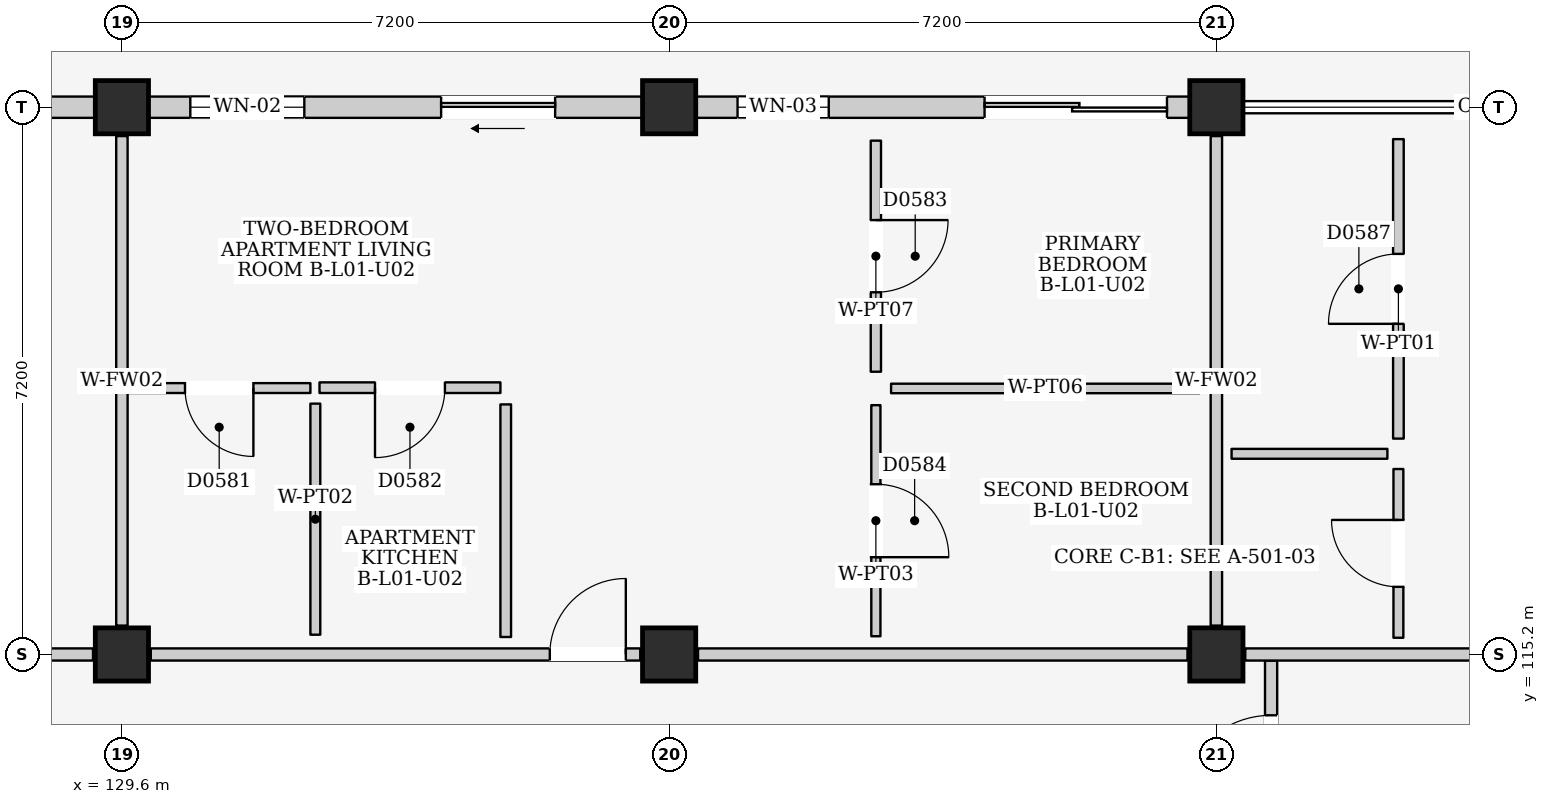
"""IFC4 building model, lengths in metres.
Left out: names, types, materials, properties, quantities, classifications, styles, units other than length and angle.
Written with IfcOpenShell. Run it as: python <this file> out.ifc"""

import sys

from ifc_helpers import new_model, si_unit, direction, frame, frame_2d, origin, origin_2d, place, context, subcontext, project, spatial, rectangle, extrude, element, fill, save


model = new_model("IFC4")
c1 = context("Model", 3, precision=1e-05, world=origin(), true_north=direction((0.0, 1.0)))
c2 = subcontext(c1, "Body", "Model", "MODEL_VIEW")
j1 = project(units=[si_unit("LENGTHUNIT", "METRE"), si_unit("PLANEANGLEUNIT", "RADIAN")], contexts=[c1])
p1 = place(None, origin())
s1 = spatial("IfcSite", under=j1, at=p1, CompositionType="ELEMENT")
p2 = place(p1, origin())
s2 = spatial("IfcBuilding", under=s1, at=p2, CompositionType="ELEMENT")
p3 = place(p2, frame((0.0, 0.0, 4.5)))
s3 = spatial("IfcBuildingStorey", under=s2, at=p3, CompositionType="ELEMENT", Elevation=4.5)
for number, where, z_axis, x_axis in (
    (1, (129.6, 115.2, 0.0), (0.0, 0.0, 1.0), (1.0, 0.0, 0.0)),
    (2, (129.6, 122.4, 0.0), (0.0, 0.0, 1.0), (1.0, 0.0, 0.0)),
    (3, (136.8, 115.2, 0.0), (0.0, 0.0, 1.0), (1.0, 0.0, 0.0)),
    (4, (136.8, 122.4, 0.0), (0.0, 0.0, 1.0), (1.0, 0.0, 0.0)),
    (5, (144.0, 115.2, 0.0), (0.0, 0.0, 1.0), (1.0, 0.0, 0.0)),
    (6, (144.0, 122.4, 0.0), (0.0, 0.0, 1.0), (1.0, 0.0, 0.0)),
):
    element("IfcColumn", number, at=place(p3, frame(where, z_axis=z_axis, x_axis=x_axis)), inside=s3, PredefinedType="COLUMN", context=c2, shape_type="SweptSolid", body=[
        extrude(rectangle(XDim=0.7, YDim=0.7, at=origin_2d()), origin(), (0.0, 0.0, 1.0), 4.5),
    ])
p4 = place(p3, frame((122.75, 122.4, 0.0), z_axis=(0.0, 0.0, 1.0), x_axis=(1.0, 0.0, 0.0)))
e7 = element("IfcWall", 7, at=p4, inside=s3, PredefinedType="ELEMENTEDWALL", context=c2, shape_type="SweptSolid", body=[
    extrude(rectangle(XDim=6.5, YDim=0.28, at=frame_2d((3.25, 0.0))), origin(), (0.0, 0.0, 1.0), 3.715),
])
p5 = place(p4, frame((3.85, 0.0, 0.0)))
e8 = element("IfcOpeningElement", 8, at=p5, cuts=e7, PredefinedType="OPENING", context=c2, shape_type="SweptSolid", body=[
    extrude(rectangle(XDim=1.6, YDim=2.12, at=frame_2d((0.8, 1.06))), frame((0.0, 0.155, 0.0), z_axis=(0.0, -1.0, 0.0), x_axis=(1.0, 0.0, 0.0)), (0.0, 0.0, 1.0), 0.31),
])
p6 = place(p4, frame((0.55, 0.0, 0.9)))
e9 = element("IfcOpeningElement", 9, at=p6, cuts=e7, PredefinedType="OPENING", context=c2, shape_type="SweptSolid", body=[
    extrude(rectangle(XDim=1.8, YDim=1.5, at=frame_2d((0.9, 0.75))), frame((0.0, 0.155, 0.0), z_axis=(0.0, -1.0, 0.0), x_axis=(1.0, 0.0, 0.0)), (0.0, 0.0, 1.0), 0.31),
])
p7 = place(p3, frame((129.95, 122.4, 0.0), z_axis=(0.0, 0.0, 1.0), x_axis=(1.0, 0.0, 0.0)))
e10 = element("IfcWall", 10, at=p7, inside=s3, PredefinedType="ELEMENTEDWALL", context=c2, shape_type="SweptSolid", body=[
    extrude(rectangle(XDim=6.5, YDim=0.28, at=frame_2d((3.25, 0.0))), origin(), (0.0, 0.0, 1.0), 3.715),
])
p8 = place(p7, frame((3.85, 0.0, 0.0)))
e11 = element("IfcOpeningElement", 11, at=p8, cuts=e10, PredefinedType="OPENING", context=c2, shape_type="SweptSolid", body=[
    extrude(rectangle(XDim=1.5, YDim=2.12, at=frame_2d((0.75, 1.06))), frame((0.0, 0.155, 0.0), z_axis=(0.0, -1.0, 0.0), x_axis=(1.0, 0.0, 0.0)), (0.0, 0.0, 1.0), 0.31),
])
p9 = place(p7, frame((0.55, 0.0, 0.9)))
e12 = element("IfcOpeningElement", 12, at=p9, cuts=e10, PredefinedType="OPENING", context=c2, shape_type="SweptSolid", body=[
    extrude(rectangle(XDim=1.5, YDim=1.5, at=frame_2d((0.75, 0.75))), frame((0.0, 0.155, 0.0), z_axis=(0.0, -1.0, 0.0), x_axis=(1.0, 0.0, 0.0)), (0.0, 0.0, 1.0), 0.31),
])
p10 = place(p3, frame((137.15, 122.4, 0.0), z_axis=(0.0, 0.0, 1.0), x_axis=(1.0, 0.0, 0.0)))
e13 = element("IfcWall", 13, at=p10, inside=s3, PredefinedType="ELEMENTEDWALL", context=c2, shape_type="SweptSolid", body=[
    extrude(rectangle(XDim=6.5, YDim=0.28, at=frame_2d((3.25, 0.0))), origin(), (0.0, 0.0, 1.0), 3.715),
])
p11 = place(p10, frame((3.8, 0.0, 0.0)))
e14 = element("IfcOpeningElement", 14, at=p11, cuts=e13, PredefinedType="OPENING", context=c2, shape_type="SweptSolid", body=[
    extrude(rectangle(XDim=2.4, YDim=2.12, at=frame_2d((1.2, 1.06))), frame((0.0, 0.155, 0.0), z_axis=(0.0, -1.0, 0.0), x_axis=(1.0, 0.0, 0.0)), (0.0, 0.0, 1.0), 0.31),
])
p12 = place(p10, frame((0.55, 0.0, 0.9)))
e15 = element("IfcOpeningElement", 15, at=p12, cuts=e13, PredefinedType="OPENING", context=c2, shape_type="SweptSolid", body=[
    extrude(rectangle(XDim=1.2, YDim=1.35, at=frame_2d((0.6, 0.675))), frame((0.0, 0.155, 0.0), z_axis=(0.0, -1.0, 0.0), x_axis=(1.0, 0.0, 0.0)), (0.0, 0.0, 1.0), 0.31),
])
p13 = place(p3, frame((144.72, 111.1, 0.0), z_axis=(0.0, 0.0, 1.0), x_axis=(0.0, 1.0, 0.0)))
e16 = element("IfcWall", 16, at=p13, inside=s3, PredefinedType="PARTITIONING", context=c2, shape_type="SweptSolid", body=[
    extrude(rectangle(XDim=4.02, YDim=0.16, at=frame_2d((2.01, 0.0))), origin(), (0.0, 0.0, 1.0), 4.25),
])
p14 = place(p13, frame((2.1, 0.0, 0.0)))
e17 = element("IfcOpeningElement", 17, at=p14, cuts=e16, PredefinedType="OPENING", context=c2, shape_type="SweptSolid", body=[
    extrude(rectangle(XDim=1.2, YDim=2.2, at=frame_2d((0.6, 1.1))), frame((0.0, 0.095, 0.0), z_axis=(0.0, -1.0, 0.0), x_axis=(1.0, 0.0, 0.0)), (0.0, 0.0, 1.0), 0.19),
])
p15 = place(p3, frame((122.78, 115.2, 0.0), z_axis=(0.0, 0.0, 1.0), x_axis=(1.0, 0.0, 0.0)))
e18 = element("IfcWall", 18, at=p15, inside=s3, PredefinedType="PARTITIONING", context=c2, shape_type="SweptSolid", body=[
    extrude(rectangle(XDim=6.44, YDim=0.16, at=frame_2d((3.22, 0.0))), origin(), (0.0, 0.0, 1.0), 3.635),
])
p16 = place(p15, frame((4.045, 0.0, 0.0)))
e19 = element("IfcOpeningElement", 19, at=p16, cuts=e18, PredefinedType="OPENING", context=c2, shape_type="SweptSolid", body=[
    extrude(rectangle(XDim=1.05, YDim=2.2, at=frame_2d((0.525, 1.1))), frame((0.0, 0.095, 0.0), z_axis=(0.0, -1.0, 0.0), x_axis=(1.0, 0.0, 0.0)), (0.0, 0.0, 1.0), 0.19),
])
p17 = place(p3, frame((129.6, 115.58, 0.0), z_axis=(0.0, 0.0, 1.0), x_axis=(0.0, 1.0, 0.0)))
e20 = element("IfcWall", 20, at=p17, inside=s3, PredefinedType="PARTITIONING", context=c2, shape_type="SweptSolid", body=[
    extrude(rectangle(XDim=6.44, YDim=0.15, at=frame_2d((3.22, 0.0))), origin(), (0.0, 0.0, 1.0), 3.685),
])
p18 = place(p3, frame((129.98, 115.2, 0.0), z_axis=(0.0, 0.0, 1.0), x_axis=(1.0, 0.0, 0.0)))
e21 = element("IfcWall", 21, at=p18, inside=s3, PredefinedType="PARTITIONING", context=c2, shape_type="SweptSolid", body=[
    extrude(rectangle(XDim=6.44, YDim=0.16, at=frame_2d((3.22, 0.0))), origin(), (0.0, 0.0, 1.0), 3.635),
])
p19 = place(p18, frame((5.25, 0.0, 0.0)))
e22 = element("IfcOpeningElement", 22, at=p19, cuts=e21, PredefinedType="OPENING", context=c2, shape_type="SweptSolid", body=[
    extrude(rectangle(XDim=1.0, YDim=2.15, at=frame_2d((0.5, 1.075))), frame((0.0, 0.095, 0.0), z_axis=(0.0, -1.0, 0.0), x_axis=(1.0, 0.0, 0.0)), (0.0, 0.0, 1.0), 0.19),
])
p20 = place(p3, frame((137.18, 115.2, 0.0), z_axis=(0.0, 0.0, 1.0), x_axis=(1.0, 0.0, 0.0)))
e23 = element("IfcWall", 23, at=p20, inside=s3, PredefinedType="PARTITIONING", context=c2, shape_type="SweptSolid", body=[
    extrude(rectangle(XDim=6.44, YDim=0.16, at=frame_2d((3.22, 0.0))), origin(), (0.0, 0.0, 1.0), 3.635),
])
p21 = place(p3, frame((144.0, 115.58, 0.0), z_axis=(0.0, 0.0, 1.0), x_axis=(0.0, 1.0, 0.0)))
e24 = element("IfcWall", 24, at=p21, inside=s3, PredefinedType="PARTITIONING", context=c2, shape_type="SweptSolid", body=[
    extrude(rectangle(XDim=6.44, YDim=0.15, at=frame_2d((3.22, 0.0))), origin(), (0.0, 0.0, 1.0), 3.685),
])
p22 = place(p3, frame((129.68, 118.705, 0.0), z_axis=(0.0, 0.0, 1.0), x_axis=(1.0, 0.0, 0.0)))
e25 = element("IfcWall", 25, at=p22, inside=s3, PredefinedType="PARTITIONING", context=c2, shape_type="SweptSolid", body=[
    extrude(rectangle(XDim=2.4, YDim=0.13, at=frame_2d((1.2, 0.0))), origin(), (0.0, 0.0, 1.0), 4.25),
])
p23 = place(p22, frame((0.75, 0.0, 0.0)))
e26 = element("IfcOpeningElement", 26, at=p23, cuts=e25, PredefinedType="OPENING", context=c2, shape_type="SweptSolid", body=[
    extrude(rectangle(XDim=0.9, YDim=2.1, at=frame_2d((0.45, 1.05))), frame((0.0, 0.08, 0.0), z_axis=(0.0, -1.0, 0.0), x_axis=(1.0, 0.0, 0.0)), (0.0, 0.0, 1.0), 0.16),
])
p24 = place(p3, frame((132.145, 115.46, 0.0), z_axis=(0.0, 0.0, 1.0), x_axis=(0.0, 1.0, 0.0)))
e27 = element("IfcWall", 27, at=p24, inside=s3, PredefinedType="PARTITIONING", context=c2, shape_type="SweptSolid", body=[
    extrude(rectangle(XDim=3.04, YDim=0.13, at=frame_2d((1.52, 0.0))), origin(), (0.0, 0.0, 1.0), 4.25),
])
p25 = place(p3, frame((132.2, 118.71, 0.0), z_axis=(0.0, 0.0, 1.0), x_axis=(1.0, 0.0, 0.0)))
e28 = element("IfcWall", 28, at=p25, inside=s3, PredefinedType="PARTITIONING", context=c2, shape_type="SweptSolid", body=[
    extrude(rectangle(XDim=2.38, YDim=0.14, at=frame_2d((1.19, 0.0))), origin(), (0.0, 0.0, 1.0), 4.25),
])
p26 = place(p25, frame((0.73, 0.0, 0.0)))
e29 = element("IfcOpeningElement", 29, at=p26, cuts=e28, PredefinedType="OPENING", context=c2, shape_type="SweptSolid", body=[
    extrude(rectangle(XDim=0.92, YDim=2.1, at=frame_2d((0.46, 1.05))), frame((0.0, 0.085, 0.0), z_axis=(0.0, -1.0, 0.0), x_axis=(1.0, 0.0, 0.0)), (0.0, 0.0, 1.0), 0.17),
])
p27 = place(p3, frame((134.65, 115.43, 0.0), z_axis=(0.0, 0.0, 1.0), x_axis=(0.0, 1.0, 0.0)))
e30 = element("IfcWall", 30, at=p27, inside=s3, PredefinedType="PARTITIONING", context=c2, shape_type="SweptSolid", body=[
    extrude(rectangle(XDim=3.06, YDim=0.14, at=frame_2d((1.53, 0.0))), origin(), (0.0, 0.0, 1.0), 4.25),
])
p28 = place(p3, frame((139.52, 118.92, 0.0), z_axis=(0.0, 0.0, 1.0), x_axis=(0.0, 1.0, 0.0)))
e31 = element("IfcWall", 31, at=p28, inside=s3, PredefinedType="PARTITIONING", context=c2, shape_type="SweptSolid", body=[
    extrude(rectangle(XDim=3.04, YDim=0.135, at=frame_2d((1.52, 0.0))), origin(), (0.0, 0.0, 1.0), 4.25),
])
p29 = place(p28, frame((1.045, 0.0, 0.0)))
e32 = element("IfcOpeningElement", 32, at=p29, cuts=e31, PredefinedType="OPENING", context=c2, shape_type="SweptSolid", body=[
    extrude(rectangle(XDim=0.95, YDim=2.15, at=frame_2d((0.475, 1.075))), frame((0.0, 0.083, 0.0), z_axis=(0.0, -1.0, 0.0), x_axis=(1.0, 0.0, 0.0)), (0.0, 0.0, 1.0), 0.165),
])
p30 = place(p3, frame((139.72, 118.7, 0.0), z_axis=(0.0, 0.0, 1.0), x_axis=(1.0, 0.0, 0.0)))
e33 = element("IfcWall", 33, at=p30, inside=s3, PredefinedType="PARTITIONING", context=c2, shape_type="SweptSolid", body=[
    extrude(rectangle(XDim=4.06, YDim=0.125, at=frame_2d((2.03, 0.0))), origin(), (0.0, 0.0, 1.0), 4.25),
])
p31 = place(p3, frame((139.52, 115.44, 0.0), z_axis=(0.0, 0.0, 1.0), x_axis=(0.0, 1.0, 0.0)))
e34 = element("IfcWall", 34, at=p31, inside=s3, PredefinedType="PARTITIONING", context=c2, shape_type="SweptSolid", body=[
    extrude(rectangle(XDim=3.04, YDim=0.12, at=frame_2d((1.52, 0.0))), origin(), (0.0, 0.0, 1.0), 4.25),
])
p32 = place(p31, frame((1.04, 0.0, 0.0)))
e35 = element("IfcOpeningElement", 35, at=p32, cuts=e34, PredefinedType="OPENING", context=c2, shape_type="SweptSolid", body=[
    extrude(rectangle(XDim=0.96, YDim=2.15, at=frame_2d((0.48, 1.075))), frame((0.0, 0.075, 0.0), z_axis=(0.0, -1.0, 0.0), x_axis=(1.0, 0.0, 0.0)), (0.0, 0.0, 1.0), 0.15),
])
p33 = place(p3, frame((144.38, 115.2, 0.0), z_axis=(0.0, 0.0, 1.0), x_axis=(1.0, 0.0, 0.0)))
e36 = element("IfcWall", 36, at=p33, inside=s3, PredefinedType="PARTITIONING", context=c2, shape_type="SweptSolid", body=[
    extrude(rectangle(XDim=6.44, YDim=0.16, at=frame_2d((3.22, 0.0))), origin(), (0.0, 0.0, 1.0), 3.635),
])
p34 = place(p33, frame((4.07, 0.0, 0.0)))
e37 = element("IfcOpeningElement", 37, at=p34, cuts=e36, PredefinedType="OPENING", context=c2, shape_type="SweptSolid", body=[
    extrude(rectangle(XDim=1.0, YDim=2.15, at=frame_2d((0.5, 1.075))), frame((0.0, 0.095, 0.0), z_axis=(0.0, -1.0, 0.0), x_axis=(1.0, 0.0, 0.0)), (0.0, 0.0, 1.0), 0.19),
])
p35 = place(p3, frame((144.2, 117.84, 0.0), z_axis=(0.0, 0.0, 1.0), x_axis=(1.0, 0.0, 0.0)))
e38 = element("IfcWall", 38, at=p35, inside=s3, PredefinedType="PARTITIONING", context=c2, shape_type="SweptSolid", body=[
    extrude(rectangle(XDim=2.05, YDim=0.13, at=frame_2d((1.025, 0.0))), origin(), (0.0, 0.0, 1.0), 4.25),
])
p36 = place(p3, frame((146.395, 115.42, 0.0), z_axis=(0.0, 0.0, 1.0), x_axis=(0.0, 1.0, 0.0)))
e39 = element("IfcWall", 39, at=p36, inside=s3, PredefinedType="PARTITIONING", context=c2, shape_type="SweptSolid", body=[
    extrude(rectangle(XDim=2.22, YDim=0.13, at=frame_2d((1.11, 0.0))), origin(), (0.0, 0.0, 1.0), 4.25),
])
p37 = place(p36, frame((0.67, 0.0, 0.0)))
e40 = element("IfcOpeningElement", 40, at=p37, cuts=e39, PredefinedType="OPENING", context=c2, shape_type="SweptSolid", body=[
    extrude(rectangle(XDim=0.88, YDim=2.1, at=frame_2d((0.44, 1.05))), frame((0.0, 0.08, 0.0), z_axis=(0.0, -1.0, 0.0), x_axis=(1.0, 0.0, 0.0)), (0.0, 0.0, 1.0), 0.16),
])
p38 = place(p3, frame((146.395, 118.04, 0.0), z_axis=(0.0, 0.0, 1.0), x_axis=(0.0, 1.0, 0.0)))
e41 = element("IfcWall", 41, at=p38, inside=s3, PredefinedType="PARTITIONING", context=c2, shape_type="SweptSolid", body=[
    extrude(rectangle(XDim=3.94, YDim=0.14, at=frame_2d((1.97, 0.0))), origin(), (0.0, 0.0, 1.0), 4.25),
])
p39 = place(p38, frame((1.51, 0.0, 0.0)))
e42 = element("IfcOpeningElement", 42, at=p39, cuts=e41, PredefinedType="OPENING", context=c2, shape_type="SweptSolid", body=[
    extrude(rectangle(XDim=0.92, YDim=2.1, at=frame_2d((0.46, 1.05))), frame((0.0, 0.085, 0.0), z_axis=(0.0, -1.0, 0.0), x_axis=(1.0, 0.0, 0.0)), (0.0, 0.0, 1.0), 0.17),
])
p40 = place(p8, frame((1.5, 0.0, 0.0), z_axis=(0.0, 0.0, 1.0), x_axis=(-1.0, 0.0, 0.0)))
e43 = element("IfcDoor", 43, at=p40, inside=s3, OperationType="SLIDING_TO_LEFT", PredefinedType="DOOR", context=c2, shape_type="SweptSolid", body=[
    extrude(rectangle(XDim=1.5, YDim=2.12, at=frame_2d((0.75, 1.06))), frame((0.0, 0.025, 0.0), z_axis=(0.0, -1.0, 0.0), x_axis=(1.0, 0.0, 0.0)), (0.0, 0.0, 1.0), 0.05),
])
fill(e11, e43)
p41 = place(p9, origin())
e44 = element("IfcWindow", 44, at=p41, inside=s3, PartitioningType="DOUBLE_PANEL_VERTICAL", PredefinedType="WINDOW", context=c2, shape_type="SweptSolid", body=[
    extrude(rectangle(XDim=1.5, YDim=1.5, at=frame_2d((0.75, 0.75))), frame((0.0, 0.03, 0.0), z_axis=(0.0, -1.0, 0.0), x_axis=(1.0, 0.0, 0.0)), (0.0, 0.0, 1.0), 0.06),
])
fill(e12, e44)
p42 = place(p11, frame((2.4, 0.0, 0.0), z_axis=(0.0, 0.0, 1.0), x_axis=(-1.0, 0.0, 0.0)))
e45 = element("IfcDoor", 45, at=p42, inside=s3, OperationType="DOUBLE_DOOR_SLIDING", PredefinedType="DOOR", context=c2, shape_type="SweptSolid", body=[
    extrude(rectangle(XDim=2.4, YDim=2.12, at=frame_2d((1.2, 1.06))), frame((0.0, 0.025, 0.0), z_axis=(0.0, -1.0, 0.0), x_axis=(1.0, 0.0, 0.0)), (0.0, 0.0, 1.0), 0.05),
])
fill(e14, e45)
p43 = place(p12, origin())
e46 = element("IfcWindow", 46, at=p43, inside=s3, PartitioningType="SINGLE_PANEL", PredefinedType="WINDOW", context=c2, shape_type="SweptSolid", body=[
    extrude(rectangle(XDim=1.2, YDim=1.35, at=frame_2d((0.6, 0.675))), frame((0.0, 0.03, 0.0), z_axis=(0.0, -1.0, 0.0), x_axis=(1.0, 0.0, 0.0)), (0.0, 0.0, 1.0), 0.06),
])
fill(e15, e46)
p44 = place(p14, origin())
e47 = element("IfcDoor", 47, at=p44, inside=s3, OperationType="SINGLE_SWING_LEFT", PredefinedType="DOOR", context=c2, shape_type="SweptSolid", body=[
    extrude(rectangle(XDim=1.2, YDim=2.2, at=frame_2d((0.6, 1.1))), frame((0.0, 0.025, 0.0), z_axis=(0.0, -1.0, 0.0), x_axis=(1.0, 0.0, 0.0)), (0.0, 0.0, 1.0), 0.05),
])
fill(e17, e47)
p45 = place(p19, origin())
e48 = element("IfcDoor", 48, at=p45, inside=s3, OperationType="SINGLE_SWING_RIGHT", PredefinedType="DOOR", context=c2, shape_type="SweptSolid", body=[
    extrude(rectangle(XDim=1.0, YDim=2.15, at=frame_2d((0.5, 1.075))), frame((0.0, 0.025, 0.0), z_axis=(0.0, -1.0, 0.0), x_axis=(1.0, 0.0, 0.0)), (0.0, 0.0, 1.0), 0.05),
])
fill(e22, e48)
p46 = place(p23, frame((0.9, 0.0, 0.0), z_axis=(0.0, 0.0, 1.0), x_axis=(-1.0, 0.0, 0.0)))
e49 = element("IfcDoor", 49, at=p46, inside=s3, OperationType="SINGLE_SWING_LEFT", PredefinedType="DOOR", context=c2, shape_type="SweptSolid", body=[
    extrude(rectangle(XDim=0.9, YDim=2.1, at=frame_2d((0.45, 1.05))), frame((0.0, 0.025, 0.0), z_axis=(0.0, -1.0, 0.0), x_axis=(1.0, 0.0, 0.0)), (0.0, 0.0, 1.0), 0.05),
])
fill(e26, e49)
p47 = place(p26, frame((0.92, 0.0, 0.0), z_axis=(0.0, 0.0, 1.0), x_axis=(-1.0, 0.0, 0.0)))
e50 = element("IfcDoor", 50, at=p47, inside=s3, OperationType="SINGLE_SWING_RIGHT", PredefinedType="DOOR", context=c2, shape_type="SweptSolid", body=[
    extrude(rectangle(XDim=0.92, YDim=2.1, at=frame_2d((0.46, 1.05))), frame((0.0, 0.025, 0.0), z_axis=(0.0, -1.0, 0.0), x_axis=(1.0, 0.0, 0.0)), (0.0, 0.0, 1.0), 0.05),
])
fill(e29, e50)
p48 = place(p29, frame((0.95, 0.0, 0.0), z_axis=(0.0, 0.0, 1.0), x_axis=(-1.0, 0.0, 0.0)))
e51 = element("IfcDoor", 51, at=p48, inside=s3, OperationType="SINGLE_SWING_LEFT", PredefinedType="DOOR", context=c2, shape_type="SweptSolid", body=[
    extrude(rectangle(XDim=0.95, YDim=2.15, at=frame_2d((0.475, 1.075))), frame((0.0, 0.025, 0.0), z_axis=(0.0, -1.0, 0.0), x_axis=(1.0, 0.0, 0.0)), (0.0, 0.0, 1.0), 0.05),
])
fill(e32, e51)
p49 = place(p32, frame((0.96, 0.0, 0.0), z_axis=(0.0, 0.0, 1.0), x_axis=(-1.0, 0.0, 0.0)))
e52 = element("IfcDoor", 52, at=p49, inside=s3, OperationType="SINGLE_SWING_RIGHT", PredefinedType="DOOR", context=c2, shape_type="SweptSolid", body=[
    extrude(rectangle(XDim=0.96, YDim=2.15, at=frame_2d((0.48, 1.075))), frame((0.0, 0.025, 0.0), z_axis=(0.0, -1.0, 0.0), x_axis=(1.0, 0.0, 0.0)), (0.0, 0.0, 1.0), 0.05),
])
fill(e35, e52)
p50 = place(p37, origin())
e53 = element("IfcDoor", 53, at=p50, inside=s3, OperationType="SINGLE_SWING_RIGHT", PredefinedType="DOOR", context=c2, shape_type="SweptSolid", body=[
    extrude(rectangle(XDim=0.88, YDim=2.1, at=frame_2d((0.44, 1.05))), frame((0.0, 0.025, 0.0), z_axis=(0.0, -1.0, 0.0), x_axis=(1.0, 0.0, 0.0)), (0.0, 0.0, 1.0), 0.05),
])
fill(e40, e53)
p51 = place(p39, origin())
e54 = element("IfcDoor", 54, at=p51, inside=s3, OperationType="SINGLE_SWING_LEFT", PredefinedType="DOOR", context=c2, shape_type="SweptSolid", body=[
    extrude(rectangle(XDim=0.92, YDim=2.1, at=frame_2d((0.46, 1.05))), frame((0.0, 0.025, 0.0), z_axis=(0.0, -1.0, 0.0), x_axis=(1.0, 0.0, 0.0)), (0.0, 0.0, 1.0), 0.05),
])
fill(e42, e54)
save(model, sys.argv[1])
